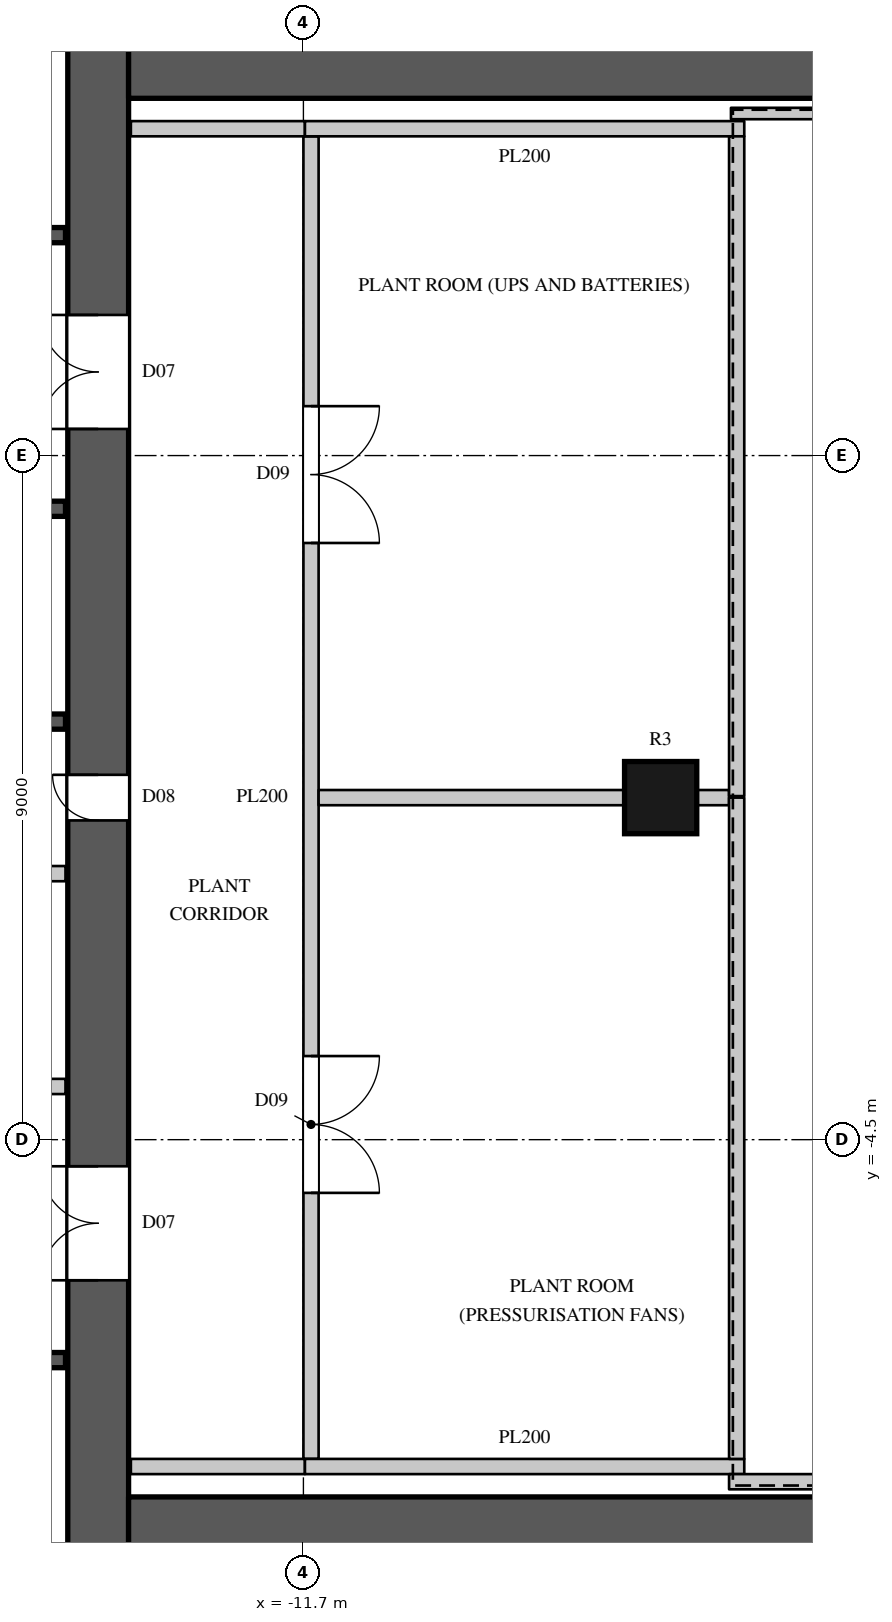
"""IFC4 building model, lengths in metres.
Left out: names, types, materials, properties, quantities, classifications, styles, units other than length and angle.
Written with IfcOpenShell. Run it as: python <this file> out.ifc"""

import sys

from ifc_helpers import new_model, si_unit, direction, frame, frame_2d, origin, origin_2d, place, context, subcontext, project, spatial, rectangle, circle, extrude, element, fill, save


model = new_model("IFC4")
c1 = context("Model", 3, precision=1e-05, world=origin(), true_north=direction((0.0, 1.0)))
c2 = subcontext(c1, "Body", "Model", "MODEL_VIEW")
j1 = project(units=[si_unit("LENGTHUNIT", "METRE"), si_unit("PLANEANGLEUNIT", "RADIAN")], contexts=[c1])
p1 = place(None, origin())
s1 = spatial("IfcSite", under=j1, at=p1, CompositionType="ELEMENT")
p2 = place(p1, origin())
s2 = spatial("IfcBuilding", under=s1, at=p2, CompositionType="ELEMENT")
p3 = place(p2, frame((0.0, 0.0, 238.4)))
s3 = spatial("IfcBuildingStorey", under=s2, at=p3, CompositionType="ELEMENT", Elevation=238.4)
p4 = place(p3, frame((-7.0, 0.0, 0.0), z_axis=(0.0, 0.0, 1.0), x_axis=(1.0, 0.0, 0.0)))
e1 = element("IfcColumn", 1, at=p4, inside=s3, PredefinedType="COLUMN", context=c2, shape_type="SweptSolid", body=[
    extrude(circle(Radius=0.475, at=origin_2d()), origin(), (0.0, 0.0, 1.0), 5.0),
])
for number, where, z_axis, x_axis in (
    (2, (-14.0, -9.6, 0.0), (0.0, 0.0, 1.0), (1.0, 0.0, 0.0)),
    (3, (-14.0, 9.6, 0.0), (0.0, 0.0, 1.0), (1.0, 0.0, 0.0)),
):
    element("IfcWall", number, at=place(p3, frame(where, z_axis=z_axis, x_axis=x_axis)), inside=s3, PredefinedType="SOLIDWALL", context=c2, shape_type="SweptSolid", body=[
        extrude(rectangle(XDim=12.0, YDim=0.8, at=frame_2d((6.0, 0.0))), origin(), (0.0, 0.0, 1.0), 4.7),
    ])
p5 = place(p3, frame((-14.4, -14.8, 0.0), z_axis=(0.0, 0.0, 1.0), x_axis=(0.0, 1.0, 0.0)))
e4 = element("IfcWall", 4, at=p5, inside=s3, PredefinedType="SHEAR", context=c2, shape_type="SweptSolid", body=[
    extrude(rectangle(XDim=29.6, YDim=0.8, at=frame_2d((14.8, 0.0))), origin(), (0.0, 0.0, 1.0), 5.0),
])
p6 = place(p5, frame((1.55, 0.0, 0.0)))
e5 = element("IfcOpeningElement", 5, at=p6, cuts=e4, PredefinedType="OPENING", context=c2, shape_type="SweptSolid", body=[
    extrude(rectangle(XDim=1.5, YDim=2.4, at=frame_2d((0.75, 1.2))), frame((0.0, 0.41, 0.0), z_axis=(0.0, -1.0, 0.0), x_axis=(1.0, 0.0, 0.0)), (0.0, 0.0, 1.0), 0.82),
])
p7 = place(p5, frame((26.55, 0.0, 0.0)))
e6 = element("IfcOpeningElement", 6, at=p7, cuts=e4, PredefinedType="OPENING", context=c2, shape_type="SweptSolid", body=[
    extrude(rectangle(XDim=1.5, YDim=2.4, at=frame_2d((0.75, 1.2))), frame((0.0, 0.41, 0.0), z_axis=(0.0, -1.0, 0.0), x_axis=(1.0, 0.0, 0.0)), (0.0, 0.0, 1.0), 0.82),
])
p8 = place(p5, frame((8.45, 0.0, 0.0)))
e7 = element("IfcOpeningElement", 7, at=p8, cuts=e4, PredefinedType="OPENING", context=c2, shape_type="SweptSolid", body=[
    extrude(rectangle(XDim=1.5, YDim=2.4, at=frame_2d((0.75, 1.2))), frame((0.0, 0.41, 0.0), z_axis=(0.0, -1.0, 0.0), x_axis=(1.0, 0.0, 0.0)), (0.0, 0.0, 1.0), 0.82),
])
p9 = place(p5, frame((19.65, 0.0, 0.0)))
e8 = element("IfcOpeningElement", 8, at=p9, cuts=e4, PredefinedType="OPENING", context=c2, shape_type="SweptSolid", body=[
    extrude(rectangle(XDim=1.5, YDim=2.4, at=frame_2d((0.75, 1.2))), frame((0.0, 0.41, 0.0), z_axis=(0.0, -1.0, 0.0), x_axis=(1.0, 0.0, 0.0)), (0.0, 0.0, 1.0), 0.82),
])
p10 = place(p5, frame((14.5, 0.0, 0.0)))
e9 = element("IfcOpeningElement", 9, at=p10, cuts=e4, PredefinedType="OPENING", context=c2, shape_type="SweptSolid", body=[
    extrude(rectangle(XDim=0.6, YDim=2.0, at=frame_2d((0.3, 1.0))), frame((0.0, 0.41, 0.0), z_axis=(0.0, -1.0, 0.0), x_axis=(1.0, 0.0, 0.0)), (0.0, 0.0, 1.0), 0.82),
])
p11 = place(p3, frame((-18.78, -3.8, 0.0), z_axis=(0.0, 0.0, 1.0), x_axis=(1.0, 0.0, 0.0)))
e10 = element("IfcWall", 10, at=p11, inside=s3, PredefinedType="PARTITIONING", context=c2, shape_type="SweptSolid", body=[
    extrude(rectangle(XDim=3.95, YDim=0.2, at=frame_2d((1.975, 0.0))), origin(), (0.0, 0.0, 1.0), 4.7),
])
p12 = place(p11, frame((1.5, 0.0, 0.0)))
e11 = element("IfcOpeningElement", 11, at=p12, cuts=e10, PredefinedType="OPENING", context=c2, shape_type="SweptSolid", body=[
    extrude(rectangle(XDim=0.9, YDim=2.2, at=frame_2d((0.45, 1.1))), frame((0.0, 0.11, 0.0), z_axis=(0.0, -1.0, 0.0), x_axis=(1.0, 0.0, 0.0)), (0.0, 0.0, 1.0), 0.22),
])
for number, where, z_axis, x_axis in (
    (12, (-13.97, -8.8, 0.0), (0.0, 0.0, 1.0), (1.0, 0.0, 0.0)),
    (13, (-13.97, 8.8, 0.0), (0.0, 0.0, 1.0), (1.0, 0.0, 0.0)),
):
    element("IfcWall", number, at=place(p3, frame(where, z_axis=z_axis, x_axis=x_axis)), inside=s3, PredefinedType="PARTITIONING", context=c2, shape_type="SweptSolid", body=[
        extrude(rectangle(XDim=2.29, YDim=0.2, at=frame_2d((1.145, 0.0))), origin(), (0.0, 0.0, 1.0), 4.7),
    ])
p13 = place(p3, frame((-6.075, 9.0, 0.0), z_axis=(0.0, 0.0, 1.0), x_axis=(1.0, 0.0, 0.0)))
e14 = element("IfcWall", 14, at=p13, inside=s3, PredefinedType="PARTITIONING", context=c2, shape_type="SweptSolid", body=[
    extrude(rectangle(XDim=14.15, YDim=0.15, at=frame_2d((7.075, 0.0))), origin(), (0.0, 0.0, 1.0), 4.7),
])
p14 = place(p3, frame((-29.17, -1.0, 0.0), z_axis=(0.0, 0.0, 1.0), x_axis=(1.0, 0.0, 0.0)))
e15 = element("IfcWall", 15, at=p14, inside=s3, PredefinedType="PARTITIONING", context=c2, shape_type="SweptSolid", body=[
    extrude(rectangle(XDim=14.34, YDim=0.2, at=frame_2d((7.17, 0.0))), origin(), (0.0, 0.0, 1.0), 4.7),
])
p15 = place(p3, frame((-11.6, -8.7, 0.0), z_axis=(0.0, 0.0, 1.0), x_axis=(0.0, 1.0, 0.0)))
e16 = element("IfcWall", 16, at=p15, inside=s3, PredefinedType="PARTITIONING", context=c2, shape_type="SweptSolid", body=[
    extrude(rectangle(XDim=17.4, YDim=0.2, at=frame_2d((8.7, 0.0))), origin(), (0.0, 0.0, 1.0), 4.15),
])
p16 = place(p15, frame((3.5, 0.0, 0.0)))
e17 = element("IfcOpeningElement", 17, at=p16, cuts=e16, PredefinedType="OPENING", context=c2, shape_type="SweptSolid", body=[
    extrude(rectangle(XDim=1.8, YDim=2.4, at=frame_2d((0.9, 1.2))), frame((0.0, 0.11, 0.0), z_axis=(0.0, -1.0, 0.0), x_axis=(1.0, 0.0, 0.0)), (0.0, 0.0, 1.0), 0.22),
])
p17 = place(p15, frame((12.05, 0.0, 0.0)))
e18 = element("IfcOpeningElement", 18, at=p17, cuts=e16, PredefinedType="OPENING", context=c2, shape_type="SweptSolid", body=[
    extrude(rectangle(XDim=1.8, YDim=2.4, at=frame_2d((0.9, 1.2))), frame((0.0, 0.11, 0.0), z_axis=(0.0, -1.0, 0.0), x_axis=(1.0, 0.0, 0.0)), (0.0, 0.0, 1.0), 0.22),
])
p18 = place(p3, frame((-11.5, 0.0, 0.0), z_axis=(0.0, 0.0, 1.0), x_axis=(1.0, 0.0, 0.0)))
e19 = element("IfcWall", 19, at=p18, inside=s3, PredefinedType="PARTITIONING", context=c2, shape_type="SweptSolid", body=[
    extrude(rectangle(XDim=4.025, YDim=0.2, at=frame_2d((2.012, 0.0))), origin(), (0.0, 0.0, 1.0), 4.7),
])
p19 = place(p3, frame((-6.525, 0.0, 0.0), z_axis=(0.0, 0.0, 1.0), x_axis=(1.0, 0.0, 0.0)))
e20 = element("IfcWall", 20, at=p19, inside=s3, PredefinedType="PARTITIONING", context=c2, shape_type="SweptSolid", body=[
    extrude(rectangle(XDim=0.425, YDim=0.2, at=frame_2d((0.212, 0.0))), origin(), (0.0, 0.0, 1.0), 4.7),
])
for number, where, z_axis, x_axis in (
    (21, (-11.68, -8.8, 0.0), (0.0, 0.0, 1.0), (1.0, 0.0, 0.0)),
    (22, (-11.68, 8.8, 0.0), (0.0, 0.0, 1.0), (1.0, 0.0, 0.0)),
):
    element("IfcWall", number, at=place(p3, frame(where, z_axis=z_axis, x_axis=x_axis)), inside=s3, PredefinedType="PARTITIONING", context=c2, shape_type="SweptSolid", body=[
        extrude(rectangle(XDim=5.78, YDim=0.2, at=frame_2d((2.89, 0.0))), origin(), (0.0, 0.0, 1.0), 4.7),
    ])
p20 = place(p3, frame((-6.1, -9.0, 0.0), z_axis=(0.0, 0.0, 1.0), x_axis=(1.0, 0.0, 0.0)))
e23 = element("IfcWall", 23, at=p20, inside=s3, PredefinedType="PARTITIONING", context=c2, shape_type="SweptSolid", body=[
    extrude(rectangle(XDim=14.2, YDim=0.2, at=frame_2d((7.1, 0.0))), origin(), (0.0, 0.0, 1.0), 4.7),
])
p21 = place(p3, frame((-6.0, -8.7, 0.0), z_axis=(0.0, 0.0, 1.0), x_axis=(0.0, 1.0, 0.0)))
e24 = element("IfcWall", 24, at=p21, inside=s3, PredefinedType="PARTITIONING", context=c2, shape_type="SweptSolid", body=[
    extrude(rectangle(XDim=8.7, YDim=0.2, at=frame_2d((4.35, 0.0))), origin(), (0.0, 0.0, 1.0), 4.7),
])
p22 = place(p3, frame((-6.0, 0.02, 0.0), z_axis=(0.0, 0.0, 1.0), x_axis=(0.0, 1.0, 0.0)))
e25 = element("IfcWall", 25, at=p22, inside=s3, PredefinedType="PARTITIONING", context=c2, shape_type="SweptSolid", body=[
    extrude(rectangle(XDim=8.68, YDim=0.2, at=frame_2d((4.34, 0.0))), origin(), (0.0, 0.0, 1.0), 4.7),
])
for number, where, z_axis, x_axis in (
    (26, (-17.9, -7.4, 0.0), (0.0, 0.0, 1.0), (1.0, 0.0, 0.0)),
    (27, (-17.9, 1.0, 0.0), (0.0, 0.0, 1.0), (1.0, 0.0, 0.0)),
    (28, (-17.9, 3.8, 0.0), (0.0, 0.0, 1.0), (1.0, 0.0, 0.0)),
):
    element("IfcWall", number, at=place(p3, frame(where, z_axis=z_axis, x_axis=x_axis)), inside=s3, PredefinedType="SHEAR", context=c2, shape_type="SweptSolid", body=[
        extrude(rectangle(XDim=3.07, YDim=0.2, at=frame_2d((1.535, 0.0))), origin(), (0.0, 0.0, 1.0), 4.7),
    ])
p23 = place(p3, frame((-17.92, 7.4, 0.0), z_axis=(0.0, 0.0, 1.0), x_axis=(1.0, 0.0, 0.0)))
e29 = element("IfcWall", 29, at=p23, inside=s3, PredefinedType="SHEAR", context=c2, shape_type="SweptSolid", body=[
    extrude(rectangle(XDim=3.09, YDim=0.2, at=frame_2d((1.545, 0.0))), origin(), (0.0, 0.0, 1.0), 4.7),
])
p24 = place(p16, origin())
e30 = element("IfcDoor", 30, at=p24, inside=s3, OperationType="DOUBLE_DOOR_SINGLE_SWING", PredefinedType="DOOR", context=c2, shape_type="SweptSolid", body=[
    extrude(rectangle(XDim=1.8, YDim=2.4, at=frame_2d((0.9, 1.2))), frame((0.0, 0.025, 0.0), z_axis=(0.0, -1.0, 0.0), x_axis=(1.0, 0.0, 0.0)), (0.0, 0.0, 1.0), 0.05),
])
fill(e17, e30)
p25 = place(p17, origin())
e31 = element("IfcDoor", 31, at=p25, inside=s3, OperationType="DOUBLE_DOOR_SINGLE_SWING", PredefinedType="DOOR", context=c2, shape_type="SweptSolid", body=[
    extrude(rectangle(XDim=1.8, YDim=2.4, at=frame_2d((0.9, 1.2))), frame((0.0, 0.025, 0.0), z_axis=(0.0, -1.0, 0.0), x_axis=(1.0, 0.0, 0.0)), (0.0, 0.0, 1.0), 0.05),
])
fill(e18, e31)
p26 = place(p8, origin())
e32 = element("IfcDoor", 32, at=p26, inside=s3, OperationType="DOUBLE_DOOR_SINGLE_SWING", PredefinedType="DOOR", context=c2, shape_type="SweptSolid", body=[
    extrude(rectangle(XDim=1.5, YDim=2.4, at=frame_2d((0.75, 1.2))), frame((0.0, 0.395, 0.0), z_axis=(0.0, -1.0, 0.0), x_axis=(1.0, 0.0, 0.0)), (0.0, 0.0, 1.0), 0.05),
])
fill(e7, e32)
p27 = place(p9, origin())
e33 = element("IfcDoor", 33, at=p27, inside=s3, OperationType="DOUBLE_DOOR_SINGLE_SWING", PredefinedType="DOOR", context=c2, shape_type="SweptSolid", body=[
    extrude(rectangle(XDim=1.5, YDim=2.4, at=frame_2d((0.75, 1.2))), frame((0.0, 0.395, 0.0), z_axis=(0.0, -1.0, 0.0), x_axis=(1.0, 0.0, 0.0)), (0.0, 0.0, 1.0), 0.05),
])
fill(e8, e33)
p28 = place(p10, origin())
e34 = element("IfcDoor", 34, at=p28, inside=s3, OperationType="SINGLE_SWING_RIGHT", PredefinedType="DOOR", context=c2, shape_type="SweptSolid", body=[
    extrude(rectangle(XDim=0.6, YDim=2.0, at=frame_2d((0.3, 1.0))), frame((0.0, 0.395, 0.0), z_axis=(0.0, -1.0, 0.0), x_axis=(1.0, 0.0, 0.0)), (0.0, 0.0, 1.0), 0.05),
])
fill(e9, e34)
save(model, sys.argv[1])
